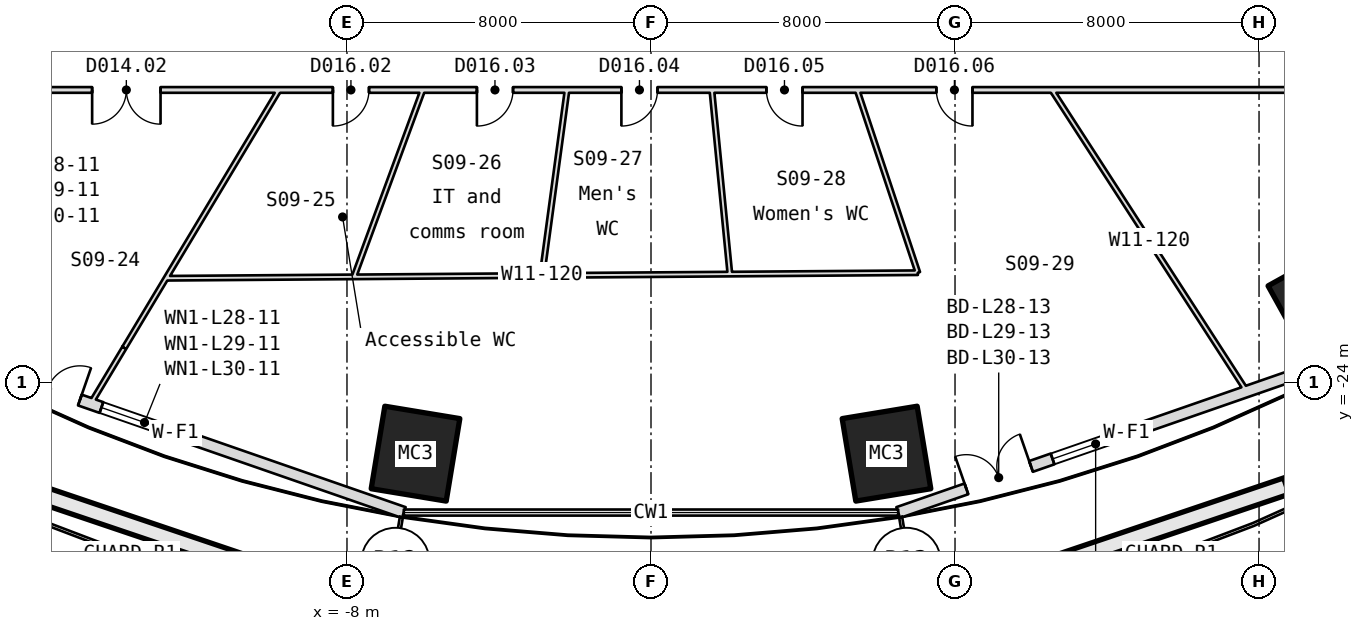
"""IFC4 building model, lengths in metres.
Left out: names, types, materials, properties, quantities, classifications, styles, units other than length and angle.
Written with IfcOpenShell. Run it as: python <this file> out.ifc"""

import sys

from ifc_helpers import new_model, si_unit, direction, frame, frame_2d, origin, origin_2d, place, context, subcontext, project, spatial, rectangle, hollow_rectangle, extrude, element, fill, save


model = new_model("IFC4")
c1 = context("Model", 3, precision=1e-05, world=origin(), true_north=direction((0.0, 1.0)))
c2 = subcontext(c1, "Body", "Model", "MODEL_VIEW")
j1 = project(units=[si_unit("LENGTHUNIT", "METRE"), si_unit("PLANEANGLEUNIT", "RADIAN")], contexts=[c1])
p1 = place(None, origin())
s1 = spatial("IfcSite", under=j1, at=p1, CompositionType="ELEMENT")
p2 = place(p1, origin())
s2 = spatial("IfcBuilding", under=s1, at=p2, CompositionType="ELEMENT")
p3 = place(p2, frame((0.0, 0.0, 132.6)))
s3 = spatial("IfcBuildingStorey", under=s2, at=p3, CompositionType="ELEMENT", Elevation=132.6)
for number, where, z_axis, x_axis in (
    (1, (-6.197, -25.87, -0.18), (0.0, 0.0, 1.0), (-0.987, 0.163, 0.0)),
    (2, (6.197, -25.87, -0.18), (0.0, 0.0, 1.0), (-0.987, -0.163, 0.0)),
    (3, (17.646, -21.932, -0.18), (0.0, 0.0, 1.0), (-0.874, -0.485, 0.0)),
):
    element("IfcColumn", number, at=place(p3, frame(where, z_axis=z_axis, x_axis=x_axis)), inside=s3, PredefinedType="COLUMN", context=c2, shape_type="SweptSolid", body=[
        extrude(hollow_rectangle(XDim=2.0, YDim=2.2, WallThickness=0.08, at=origin_2d()), origin(), (0.0, 0.0, 1.0), 4.15),
    ])
p4 = place(p3, frame((-18.524, -23.245, 0.0), z_axis=(0.0, 0.0, 1.0), x_axis=(0.944642444618, -0.328101587661, 0.0)))
e4 = element("IfcWall", 4, at=p4, inside=s3, PredefinedType="SOLIDWALL", context=c2, shape_type="SweptSolid", body=[
    extrude(rectangle(XDim=12.723, YDim=0.3, at=frame_2d((6.362, 0.0))), origin(), (0.0, 0.0, 1.0), 3.97),
])
p5 = place(p4, frame((1.9, 0.0, 0.0)))
e5 = element("IfcOpeningElement", 5, at=p5, cuts=e4, PredefinedType="OPENING", context=c2, shape_type="SweptSolid", body=[
    extrude(rectangle(XDim=1.8, YDim=2.4, at=frame_2d((0.9, 1.2))), frame((0.0, 0.16, 0.0), z_axis=(0.0, -1.0, 0.0), x_axis=(1.0, 0.0, 0.0)), (0.0, 0.0, 1.0), 0.32),
])
p6 = place(p4, frame((4.3, 0.0, 0.9)))
e6 = element("IfcOpeningElement", 6, at=p6, cuts=e4, PredefinedType="OPENING", context=c2, shape_type="SweptSolid", body=[
    extrude(rectangle(XDim=2.4, YDim=1.5, at=frame_2d((1.2, 0.75))), frame((0.0, 0.16, 0.0), z_axis=(0.0, -1.0, 0.0), x_axis=(1.0, 0.0, 0.0)), (0.0, 0.0, 1.0), 0.32),
])
p7 = place(p3, frame((6.505, -27.42, 0.0), z_axis=(0.0, 0.0, 1.0), x_axis=(0.944644510201, 0.32809564055, 0.0)))
e7 = element("IfcWall", 7, at=p7, inside=s3, PredefinedType="SOLIDWALL", context=c2, shape_type="SweptSolid", body=[
    extrude(rectangle(XDim=12.724, YDim=0.3, at=frame_2d((6.362, 0.0))), origin(), (0.0, 0.0, 1.0), 3.97),
])
p8 = place(p7, frame((1.9, 0.0, 0.0)))
e8 = element("IfcOpeningElement", 8, at=p8, cuts=e7, PredefinedType="OPENING", context=c2, shape_type="SweptSolid", body=[
    extrude(rectangle(XDim=1.8, YDim=2.4, at=frame_2d((0.9, 1.2))), frame((0.0, 0.16, 0.0), z_axis=(0.0, -1.0, 0.0), x_axis=(1.0, 0.0, 0.0)), (0.0, 0.0, 1.0), 0.32),
])
p9 = place(p7, frame((4.3, 0.0, 0.9)))
e9 = element("IfcOpeningElement", 9, at=p9, cuts=e7, PredefinedType="OPENING", context=c2, shape_type="SweptSolid", body=[
    extrude(rectangle(XDim=2.4, YDim=1.5, at=frame_2d((1.2, 0.75))), frame((0.0, 0.16, 0.0), z_axis=(0.0, -1.0, 0.0), x_axis=(1.0, 0.0, 0.0)), (0.0, 0.0, 1.0), 0.32),
])
p10 = place(p3, frame((-12.762, -21.255, 0.0), z_axis=(0.0, 0.0, 1.0), x_axis=(0.999972864722, 0.007366805289, 0.0)))
e10 = element("IfcWall", 10, at=p10, inside=s3, PredefinedType="PARTITIONING", context=c2, shape_type="SweptSolid", body=[
    extrude(rectangle(XDim=19.785, YDim=0.12, at=frame_2d((9.893, 0.0))), origin(), (0.0, 0.0, 1.0), 3.97),
])
p11 = place(p3, frame((-9.787, -16.3, 0.0), z_axis=(0.0, 0.0, 1.0), x_axis=(-0.514767791152, -0.857329645581, 0.0)))
e11 = element("IfcWall", 11, at=p11, inside=s3, PredefinedType="PARTITIONING", context=c2, shape_type="SweptSolid", body=[
    extrude(rectangle(XDim=7.918, YDim=0.12, at=frame_2d((3.959, 0.0))), origin(), (0.0, 0.0, 1.0), 3.434),
])
p12 = place(p3, frame((-13.863, -23.088, 0.0), z_axis=(0.0, 0.0, 1.0), x_axis=(-0.514663331063, -0.85739235806, 0.0)))
e12 = element("IfcWall", 12, at=p12, inside=s3, PredefinedType="PARTITIONING", context=c2, shape_type="SweptSolid", body=[
    extrude(rectangle(XDim=1.714, YDim=0.12, at=frame_2d((0.857, 0.0))), origin(), (0.0, 0.0, 1.0), 3.97),
])
p13 = place(p3, frame((-7.816, -21.218, 0.0), z_axis=(0.0, 0.0, 1.0), x_axis=(0.345670821163, 0.938355840498, 0.0)))
e13 = element("IfcWall", 13, at=p13, inside=s3, PredefinedType="PARTITIONING", context=c2, shape_type="SweptSolid", body=[
    extrude(rectangle(XDim=5.241, YDim=0.12, at=frame_2d((2.621, 0.0))), origin(), (0.0, 0.0, 1.0), 3.97),
])
p14 = place(p3, frame((-2.87, -21.182, 0.0), z_axis=(0.0, 0.0, 1.0), x_axis=(0.134257269098, 0.990946510007, 0.0)))
e14 = element("IfcWall", 14, at=p14, inside=s3, PredefinedType="PARTITIONING", context=c2, shape_type="SweptSolid", body=[
    extrude(rectangle(XDim=4.926, YDim=0.12, at=frame_2d((2.463, 0.0))), origin(), (0.0, 0.0, 1.0), 3.97),
])
p15 = place(p3, frame((2.076, -21.145, 0.0), z_axis=(0.0, 0.0, 1.0), x_axis=(-0.097736013263, 0.99521237518, 0.0)))
e15 = element("IfcWall", 15, at=p15, inside=s3, PredefinedType="PARTITIONING", context=c2, shape_type="SweptSolid", body=[
    extrude(rectangle(XDim=4.868, YDim=0.12, at=frame_2d((2.434, 0.0))), origin(), (0.0, 0.0, 1.0), 3.97),
])
p16 = place(p3, frame((7.022, -21.109, 0.0), z_axis=(0.0, 0.0, 1.0), x_axis=(-0.315678539319, 0.948866197002, 0.0)))
e16 = element("IfcWall", 16, at=p16, inside=s3, PredefinedType="PARTITIONING", context=c2, shape_type="SweptSolid", body=[
    extrude(rectangle(XDim=5.068, YDim=0.12, at=frame_2d((2.534, 0.0))), origin(), (0.0, 0.0, 1.0), 3.97),
])
p17 = place(p3, frame((10.546, -16.3, 0.0), z_axis=(0.0, 0.0, 1.0), x_axis=(0.543211638751, -0.839595804852, 0.0)))
e17 = element("IfcWall", 17, at=p17, inside=s3, PredefinedType="PARTITIONING", context=c2, shape_type="SweptSolid", body=[
    extrude(rectangle(XDim=9.449, YDim=0.12, at=frame_2d((4.725, 0.0))), origin(), (0.0, 0.0, 1.0), 3.97),
])
p18 = place(p3, frame((19.3, -16.3, 0.0), z_axis=(0.0, 0.0, 1.0), x_axis=(-1.0, 0.0, 0.0)))
e18 = element("IfcWall", 18, at=p18, inside=s3, PredefinedType="PARTITIONING", context=c2, shape_type="SweptSolid", body=[
    extrude(rectangle(XDim=38.6, YDim=0.15, at=frame_2d((19.3, 0.0))), origin(), (0.0, 0.0, 1.0), 3.97),
])
p19 = place(p18, frame((32.206, 0.0, 0.0)))
e19 = element("IfcOpeningElement", 19, at=p19, cuts=e18, PredefinedType="OPENING", context=c2, shape_type="SweptSolid", body=[
    extrude(rectangle(XDim=1.8, YDim=2.1, at=frame_2d((0.9, 1.05))), frame((0.0, 0.085, 0.0), z_axis=(0.0, -1.0, 0.0), x_axis=(1.0, 0.0, 0.0)), (0.0, 0.0, 1.0), 0.17),
])
p20 = place(p18, frame((26.721, 0.0, 0.0)))
e20 = element("IfcOpeningElement", 20, at=p20, cuts=e18, PredefinedType="OPENING", context=c2, shape_type="SweptSolid", body=[
    extrude(rectangle(XDim=0.95, YDim=2.1, at=frame_2d((0.475, 1.05))), frame((0.0, 0.085, 0.0), z_axis=(0.0, -1.0, 0.0), x_axis=(1.0, 0.0, 0.0)), (0.0, 0.0, 1.0), 0.17),
])
p21 = place(p18, frame((22.931, 0.0, 0.0)))
e21 = element("IfcOpeningElement", 21, at=p21, cuts=e18, PredefinedType="OPENING", context=c2, shape_type="SweptSolid", body=[
    extrude(rectangle(XDim=0.95, YDim=2.1, at=frame_2d((0.475, 1.05))), frame((0.0, 0.085, 0.0), z_axis=(0.0, -1.0, 0.0), x_axis=(1.0, 0.0, 0.0)), (0.0, 0.0, 1.0), 0.17),
])
p22 = place(p18, frame((19.129, 0.0, 0.0)))
e22 = element("IfcOpeningElement", 22, at=p22, cuts=e18, PredefinedType="OPENING", context=c2, shape_type="SweptSolid", body=[
    extrude(rectangle(XDim=0.95, YDim=2.1, at=frame_2d((0.475, 1.05))), frame((0.0, 0.085, 0.0), z_axis=(0.0, -1.0, 0.0), x_axis=(1.0, 0.0, 0.0)), (0.0, 0.0, 1.0), 0.17),
])
p23 = place(p18, frame((15.313, 0.0, 0.0)))
e23 = element("IfcOpeningElement", 23, at=p23, cuts=e18, PredefinedType="OPENING", context=c2, shape_type="SweptSolid", body=[
    extrude(rectangle(XDim=0.95, YDim=2.1, at=frame_2d((0.475, 1.05))), frame((0.0, 0.085, 0.0), z_axis=(0.0, -1.0, 0.0), x_axis=(1.0, 0.0, 0.0)), (0.0, 0.0, 1.0), 0.17),
])
p24 = place(p18, frame((10.841, 0.0, 0.0)))
e24 = element("IfcOpeningElement", 24, at=p24, cuts=e18, PredefinedType="OPENING", context=c2, shape_type="SweptSolid", body=[
    extrude(rectangle(XDim=0.95, YDim=2.1, at=frame_2d((0.475, 1.05))), frame((0.0, 0.085, 0.0), z_axis=(0.0, -1.0, 0.0), x_axis=(1.0, 0.0, 0.0)), (0.0, 0.0, 1.0), 0.17),
])
p25 = place(p5, origin())
e25 = element("IfcDoor", 25, at=p25, inside=s3, OperationType="SINGLE_SWING_LEFT", PredefinedType="DOOR", context=c2, shape_type="SweptSolid", body=[
    extrude(rectangle(XDim=1.8, YDim=2.4, at=frame_2d((0.9, 1.2))), frame((0.0, 0.025, 0.0), z_axis=(0.0, -1.0, 0.0), x_axis=(1.0, 0.0, 0.0)), (0.0, 0.0, 1.0), 0.05),
])
fill(e5, e25)
p26 = place(p6, origin())
e26 = element("IfcWindow", 26, at=p26, inside=s3, PartitioningType="SINGLE_PANEL", PredefinedType="WINDOW", context=c2, shape_type="SweptSolid", body=[
    extrude(rectangle(XDim=2.4, YDim=1.5, at=frame_2d((1.2, 0.75))), frame((0.0, 0.03, 0.0), z_axis=(0.0, -1.0, 0.0), x_axis=(1.0, 0.0, 0.0)), (0.0, 0.0, 1.0), 0.06),
])
fill(e6, e26)
p27 = place(p8, origin())
e27 = element("IfcDoor", 27, at=p27, inside=s3, OperationType="SINGLE_SWING_LEFT", PredefinedType="DOOR", context=c2, shape_type="SweptSolid", body=[
    extrude(rectangle(XDim=1.8, YDim=2.4, at=frame_2d((0.9, 1.2))), frame((0.0, 0.025, 0.0), z_axis=(0.0, -1.0, 0.0), x_axis=(1.0, 0.0, 0.0)), (0.0, 0.0, 1.0), 0.05),
])
fill(e8, e27)
p28 = place(p9, origin())
e28 = element("IfcWindow", 28, at=p28, inside=s3, PartitioningType="SINGLE_PANEL", PredefinedType="WINDOW", context=c2, shape_type="SweptSolid", body=[
    extrude(rectangle(XDim=2.4, YDim=1.5, at=frame_2d((1.2, 0.75))), frame((0.0, 0.03, 0.0), z_axis=(0.0, -1.0, 0.0), x_axis=(1.0, 0.0, 0.0)), (0.0, 0.0, 1.0), 0.06),
])
fill(e9, e28)
p29 = place(p19, origin())
e29 = element("IfcDoor", 29, at=p29, inside=s3, OperationType="DOUBLE_DOOR_SINGLE_SWING", PredefinedType="DOOR", context=c2, shape_type="SweptSolid", body=[
    extrude(rectangle(XDim=1.8, YDim=2.1, at=frame_2d((0.9, 1.05))), frame((0.0, 0.025, 0.0), z_axis=(0.0, -1.0, 0.0), x_axis=(1.0, 0.0, 0.0)), (0.0, 0.0, 1.0), 0.05),
])
fill(e19, e29)
p30 = place(p20, origin())
e30 = element("IfcDoor", 30, at=p30, inside=s3, OperationType="SINGLE_SWING_RIGHT", PredefinedType="DOOR", context=c2, shape_type="SweptSolid", body=[
    extrude(rectangle(XDim=0.95, YDim=2.1, at=frame_2d((0.475, 1.05))), frame((0.0, 0.025, 0.0), z_axis=(0.0, -1.0, 0.0), x_axis=(1.0, 0.0, 0.0)), (0.0, 0.0, 1.0), 0.05),
])
fill(e20, e30)
p31 = place(p21, origin())
e31 = element("IfcDoor", 31, at=p31, inside=s3, OperationType="SINGLE_SWING_RIGHT", PredefinedType="DOOR", context=c2, shape_type="SweptSolid", body=[
    extrude(rectangle(XDim=0.95, YDim=2.1, at=frame_2d((0.475, 1.05))), frame((0.0, 0.025, 0.0), z_axis=(0.0, -1.0, 0.0), x_axis=(1.0, 0.0, 0.0)), (0.0, 0.0, 1.0), 0.05),
])
fill(e21, e31)
p32 = place(p22, origin())
e32 = element("IfcDoor", 32, at=p32, inside=s3, OperationType="SINGLE_SWING_RIGHT", PredefinedType="DOOR", context=c2, shape_type="SweptSolid", body=[
    extrude(rectangle(XDim=0.95, YDim=2.1, at=frame_2d((0.475, 1.05))), frame((0.0, 0.025, 0.0), z_axis=(0.0, -1.0, 0.0), x_axis=(1.0, 0.0, 0.0)), (0.0, 0.0, 1.0), 0.05),
])
fill(e22, e32)
p33 = place(p23, origin())
e33 = element("IfcDoor", 33, at=p33, inside=s3, OperationType="SINGLE_SWING_RIGHT", PredefinedType="DOOR", context=c2, shape_type="SweptSolid", body=[
    extrude(rectangle(XDim=0.95, YDim=2.1, at=frame_2d((0.475, 1.05))), frame((0.0, 0.025, 0.0), z_axis=(0.0, -1.0, 0.0), x_axis=(1.0, 0.0, 0.0)), (0.0, 0.0, 1.0), 0.05),
])
fill(e23, e33)
p34 = place(p24, origin())
e34 = element("IfcDoor", 34, at=p34, inside=s3, OperationType="SINGLE_SWING_RIGHT", PredefinedType="DOOR", context=c2, shape_type="SweptSolid", body=[
    extrude(rectangle(XDim=0.95, YDim=2.1, at=frame_2d((0.475, 1.05))), frame((0.0, 0.025, 0.0), z_axis=(0.0, -1.0, 0.0), x_axis=(1.0, 0.0, 0.0)), (0.0, 0.0, 1.0), 0.05),
])
fill(e24, e34)
save(model, sys.argv[1])
